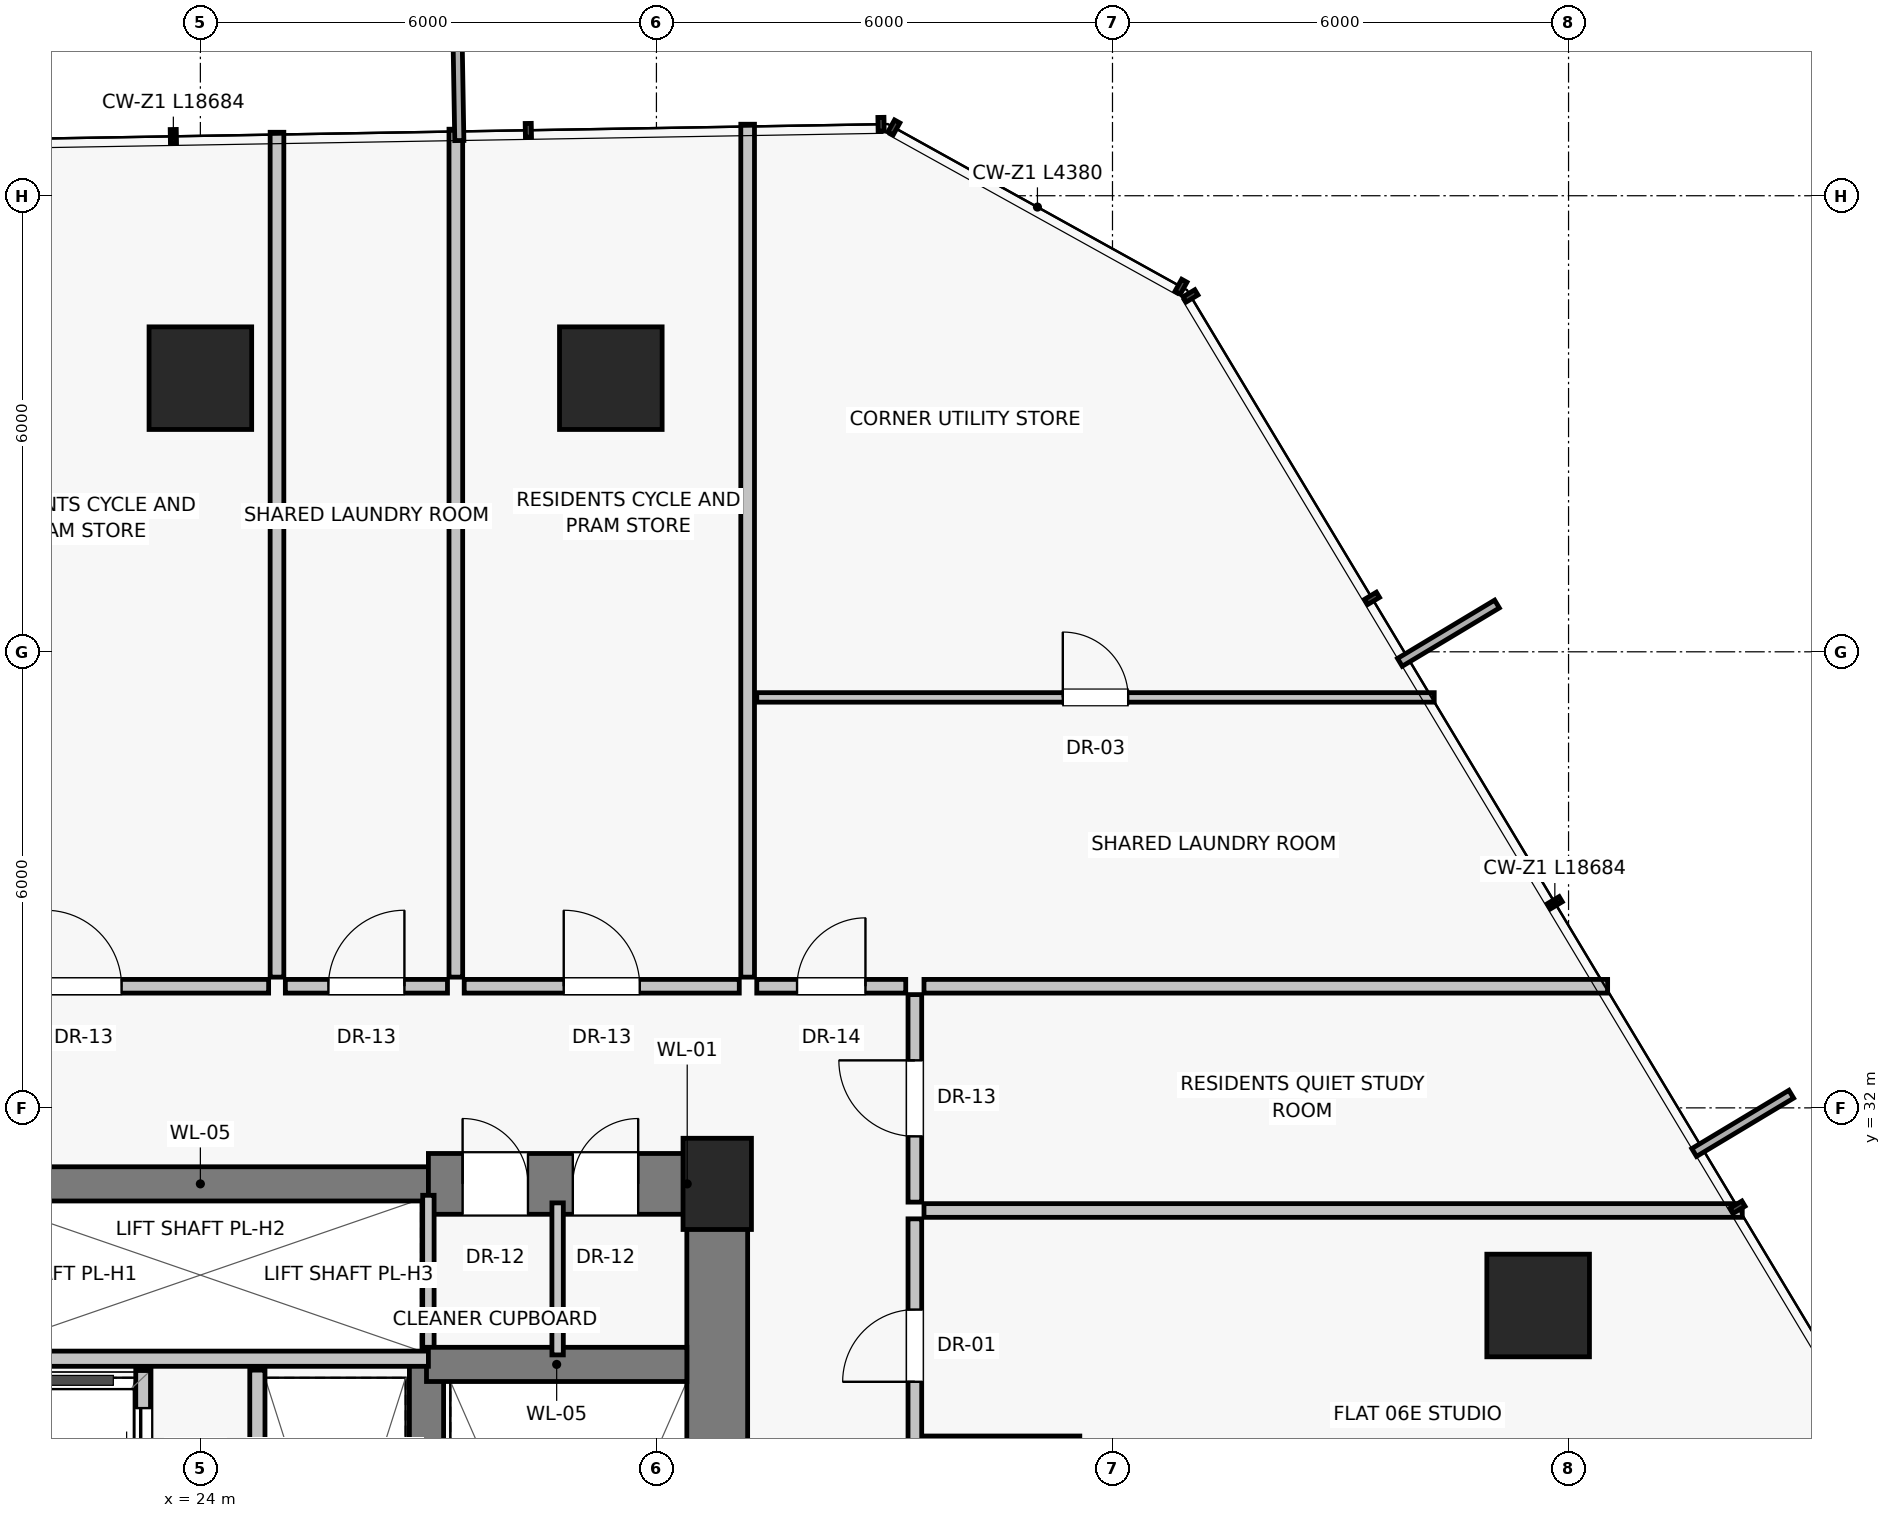
"""IFC4 building model, lengths in metres.
Left out: names, types, materials, properties, quantities, classifications, styles, units other than length and angle.
Written with IfcOpenShell. Run it as: python <this file> out.ifc"""

import sys

from ifc_helpers import new_model, si_unit, direction, frame, frame_2d, origin, origin_2d, place, context, subcontext, project, spatial, rectangle, extrude, source, transform, mapped, element, fill, save


model = new_model("IFC4")
c1 = context("Model", 3, precision=1e-05, world=origin(), true_north=direction((0.0, 1.0)))
c2 = subcontext(c1, "Body", "Model", "MODEL_VIEW")
j1 = project(units=[si_unit("LENGTHUNIT", "METRE"), si_unit("PLANEANGLEUNIT", "RADIAN")], contexts=[c1])
p1 = place(None, origin())
s1 = spatial("IfcSite", under=j1, at=p1, CompositionType="ELEMENT")
p2 = place(p1, origin())
s2 = spatial("IfcBuilding", under=s1, at=p2, CompositionType="ELEMENT")
p3 = place(p2, frame((0.0, 0.0, 27.3)))
s3 = spatial("IfcBuildingStorey", under=s2, at=p3, CompositionType="ELEMENT", Elevation=27.3)
p4 = place(p3, frame((30.8, 31.0, 0.0), z_axis=(0.0, 0.0, 1.0), x_axis=(1.0, 0.0, 0.0)))
e1 = element("IfcColumn", 1, at=p4, inside=s3, PredefinedType="PILASTER", context=c2, shape_type="SweptSolid", body=[
    extrude(rectangle(XDim=0.9, YDim=1.2, at=origin_2d()), origin(), (0.0, 0.0, 1.0), 3.25),
])
for number, where, z_axis, x_axis in (
    (2, (41.6, 29.4, 0.0), (0.0, 0.0, 1.0), (1.0, 0.0, 0.0)),
    (3, (29.4, 41.6, 0.0), (0.0, 0.0, 1.0), (1.0, 0.0, 0.0)),
    (4, (24.0, 41.6, 0.0), (0.0, 0.0, 1.0), (1.0, 0.0, 0.0)),
):
    element("IfcColumn", number, at=place(p3, frame(where, z_axis=z_axis, x_axis=x_axis)), inside=s3, PredefinedType="COLUMN", context=c2, shape_type="SweptSolid", body=[
        extrude(rectangle(XDim=1.35, YDim=1.35, at=origin_2d()), origin(), (0.0, 0.0, 1.0), 3.25),
    ])
p5 = place(p3, frame((30.8, 16.8, 0.0), z_axis=(0.0, 0.0, 1.0), x_axis=(0.0, 1.0, 0.0)))
e5 = element("IfcWall", 5, at=p5, inside=s3, PredefinedType="SHEAR", context=c2, shape_type="SweptSolid", body=[
    extrude(rectangle(XDim=14.2, YDim=0.8, at=frame_2d((7.1, 0.0))), origin(), (0.0, 0.0, 1.0), 3.0),
])
p6 = place(p3, frame((21.0, 31.0, 0.0), z_axis=(0.0, 0.0, 1.0), x_axis=(1.0, 0.0, 0.0)))
e6 = element("IfcWall", 6, at=p6, inside=s3, PredefinedType="SHEAR", context=c2, shape_type="SweptSolid", body=[
    extrude(rectangle(XDim=6.0, YDim=0.45, at=frame_2d((3.0, 0.0))), origin(), (0.0, 0.0, 1.0), 3.0),
])
p7 = place(p3, frame((27.0, 31.0, 0.0), z_axis=(0.0, 0.0, 1.0), x_axis=(1.0, 0.0, 0.0)))
e7 = element("IfcWall", 7, at=p7, inside=s3, PredefinedType="SHEAR", context=c2, shape_type="SweptSolid", body=[
    extrude(rectangle(XDim=3.8, YDim=0.8, at=frame_2d((1.9, 0.0))), origin(), (0.0, 0.0, 1.0), 3.0),
])
p8 = place(p7, frame((0.45, 0.0, 0.0)))
e8 = element("IfcOpeningElement", 8, at=p8, cuts=e7, PredefinedType="OPENING", context=c2, shape_type="SweptSolid", body=[
    extrude(rectangle(XDim=0.86, YDim=2.01, at=frame_2d((0.43, 1.005))), frame((0.0, 0.41, 0.0), z_axis=(0.0, -1.0, 0.0), x_axis=(1.0, 0.0, 0.0)), (0.0, 0.0, 1.0), 0.82),
])
p9 = place(p7, frame((1.9, 0.0, 0.0)))
e9 = element("IfcOpeningElement", 9, at=p9, cuts=e7, PredefinedType="OPENING", context=c2, shape_type="SweptSolid", body=[
    extrude(rectangle(XDim=0.86, YDim=2.01, at=frame_2d((0.43, 1.005))), frame((0.0, 0.41, 0.0), z_axis=(0.0, -1.0, 0.0), x_axis=(1.0, 0.0, 0.0)), (0.0, 0.0, 1.0), 0.82),
])
p10 = place(p3, frame((27.0, 28.65, 0.0), z_axis=(0.0, 0.0, 1.0), x_axis=(0.0, 1.0, 0.0)))
e10 = element("IfcWall", 10, at=p10, inside=s3, PredefinedType="PARTITIONING", context=c2, shape_type="SweptSolid", body=[
    extrude(rectangle(XDim=2.2, YDim=0.15, at=frame_2d((1.1, 0.0))), origin(), (0.0, 0.0, 1.0), 3.0),
])
p11 = place(p3, frame((26.975, 19.8, 0.0), z_axis=(0.0, 0.0, 1.0), x_axis=(0.0, 1.0, 0.0)))
e11 = element("IfcWall", 11, at=p11, inside=s3, PredefinedType="SHEAR", context=c2, shape_type="SweptSolid", body=[
    extrude(rectangle(XDim=8.825, YDim=0.45, at=frame_2d((4.413, 0.0))), origin(), (0.0, 0.0, 1.0), 3.0),
])
p12 = place(p3, frame((26.975, 28.625, 0.0), z_axis=(0.0, 0.0, 1.0), x_axis=(1.0, 0.0, 0.0)))
e12 = element("IfcWall", 12, at=p12, inside=s3, PredefinedType="SHEAR", context=c2, shape_type="SweptSolid", body=[
    extrude(rectangle(XDim=3.425, YDim=0.45, at=frame_2d((1.712, 0.0))), origin(), (0.0, 0.0, 1.0), 3.0),
])
p13 = place(p3, frame((21.0, 28.7, 0.0), z_axis=(0.0, 0.0, 1.0), x_axis=(1.0, 0.0, 0.0)))
e13 = element("IfcWall", 13, at=p13, inside=s3, PredefinedType="SOLIDWALL", context=c2, shape_type="SweptSolid", body=[
    extrude(rectangle(XDim=6.0, YDim=0.2, at=frame_2d((3.0, 0.0))), origin(), (0.0, 0.0, 1.0), 3.0),
])
p14 = place(p3, frame((23.25, 22.6, 0.0), z_axis=(0.0, 0.0, 1.0), x_axis=(0.0, 1.0, 0.0)))
e14 = element("IfcWall", 14, at=p14, inside=s3, PredefinedType="SOLIDWALL", context=c2, shape_type="SweptSolid", body=[
    extrude(rectangle(XDim=5.95, YDim=0.2, at=frame_2d((2.975, 0.0))), origin(), (0.0, 0.0, 1.0), 3.0),
])
p15 = place(p14, frame((0.45, 0.0, 0.0)))
e15 = element("IfcOpeningElement", 15, at=p15, cuts=e14, PredefinedType="OPENING", context=c2, shape_type="SweptSolid", body=[
    extrude(rectangle(XDim=1.1, YDim=2.08, at=frame_2d((0.55, 1.04))), frame((0.0, 0.11, 0.0), z_axis=(0.0, -1.0, 0.0), x_axis=(1.0, 0.0, 0.0)), (0.0, 0.0, 1.0), 0.22),
])
p16 = place(p14, frame((2.4, 0.0, 0.0)))
e16 = element("IfcOpeningElement", 16, at=p16, cuts=e14, PredefinedType="OPENING", context=c2, shape_type="SweptSolid", body=[
    extrude(rectangle(XDim=1.1, YDim=2.08, at=frame_2d((0.55, 1.04))), frame((0.0, 0.11, 0.0), z_axis=(0.0, -1.0, 0.0), x_axis=(1.0, 0.0, 0.0)), (0.0, 0.0, 1.0), 0.22),
])
p17 = place(p14, frame((4.35, 0.0, 0.0)))
e17 = element("IfcOpeningElement", 17, at=p17, cuts=e14, PredefinedType="OPENING", context=c2, shape_type="SweptSolid", body=[
    extrude(rectangle(XDim=1.1, YDim=2.08, at=frame_2d((0.55, 1.04))), frame((0.0, 0.11, 0.0), z_axis=(0.0, -1.0, 0.0), x_axis=(1.0, 0.0, 0.0)), (0.0, 0.0, 1.0), 0.22),
])
p18 = place(p3, frame((24.75, 22.6, 0.0), z_axis=(0.0, 0.0, 1.0), x_axis=(0.0, 1.0, 0.0)))
e18 = element("IfcWall", 18, at=p18, inside=s3, PredefinedType="SOLIDWALL", context=c2, shape_type="SweptSolid", body=[
    extrude(rectangle(XDim=5.95, YDim=0.2, at=frame_2d((2.975, 0.0))), origin(), (0.0, 0.0, 1.0), 3.0),
])
p19 = place(p3, frame((28.7, 28.75, 0.0), z_axis=(0.0, 0.0, 1.0), x_axis=(0.0, 1.0, 0.0)))
e19 = element("IfcWall", 19, at=p19, inside=s3, PredefinedType="PARTITIONING", context=c2, shape_type="SweptSolid", body=[
    extrude(rectangle(XDim=2.0, YDim=0.15, at=frame_2d((1.0, 0.0))), origin(), (0.0, 0.0, 1.0), 3.0),
])
p20 = place(p3, frame((31.2, 33.72, 0.0), z_axis=(0.0, 0.0, 1.0), x_axis=(0.0, 1.0, 0.0)))
e20 = element("IfcWall", 20, at=p20, inside=s3, PredefinedType="PARTITIONING", context=c2, shape_type="SweptSolid", body=[
    extrude(rectangle(XDim=11.221, YDim=0.18, at=frame_2d((5.61, 0.0))), origin(), (0.0, 0.0, 1.0), 3.0),
])
p21 = place(p3, frame((20.029, 33.6, 0.0), z_axis=(0.0, 0.0, 1.0), x_axis=(1.0, 0.0, 0.0)))
e21 = element("IfcWall", 21, at=p21, inside=s3, PredefinedType="PARTITIONING", context=c2, shape_type="SweptSolid", body=[
    extrude(rectangle(XDim=4.869, YDim=0.18, at=frame_2d((2.435, 0.0))), origin(), (0.0, 0.0, 1.0), 3.0),
])
p22 = place(p21, frame((1.935, 0.0, 0.0)))
e22 = element("IfcOpeningElement", 22, at=p22, cuts=e21, PredefinedType="OPENING", context=c2, shape_type="SweptSolid", body=[
    extrude(rectangle(XDim=1.0, YDim=2.01, at=frame_2d((0.5, 1.005))), frame((0.0, 0.1, 0.0), z_axis=(0.0, -1.0, 0.0), x_axis=(1.0, 0.0, 0.0)), (0.0, 0.0, 1.0), 0.2),
])
p23 = place(p3, frame((25.008, 33.72, 0.0), z_axis=(0.0, 0.0, 1.0), x_axis=(0.0, 1.0, 0.0)))
e23 = element("IfcWall", 23, at=p23, inside=s3, PredefinedType="PARTITIONING", context=c2, shape_type="SweptSolid", body=[
    extrude(rectangle(XDim=11.115, YDim=0.18, at=frame_2d((5.558, 0.0))), origin(), (0.0, 0.0, 1.0), 3.0),
])
p24 = place(p3, frame((25.118, 33.6, 0.0), z_axis=(0.0, 0.0, 1.0), x_axis=(1.0, 0.0, 0.0)))
e24 = element("IfcWall", 24, at=p24, inside=s3, PredefinedType="PARTITIONING", context=c2, shape_type="SweptSolid", body=[
    extrude(rectangle(XDim=2.133, YDim=0.18, at=frame_2d((1.066, 0.0))), origin(), (0.0, 0.0, 1.0), 3.0),
])
p25 = place(p24, frame((0.566, 0.0, 0.0)))
e25 = element("IfcOpeningElement", 25, at=p25, cuts=e24, PredefinedType="OPENING", context=c2, shape_type="SweptSolid", body=[
    extrude(rectangle(XDim=1.0, YDim=2.01, at=frame_2d((0.5, 1.005))), frame((0.0, 0.1, 0.0), z_axis=(0.0, -1.0, 0.0), x_axis=(1.0, 0.0, 0.0)), (0.0, 0.0, 1.0), 0.2),
])
p26 = place(p3, frame((27.471, 33.6, 0.0), z_axis=(0.0, 0.0, 1.0), x_axis=(1.0, 0.0, 0.0)))
e26 = element("IfcWall", 26, at=p26, inside=s3, PredefinedType="PARTITIONING", context=c2, shape_type="SweptSolid", body=[
    extrude(rectangle(XDim=3.619, YDim=0.18, at=frame_2d((1.81, 0.0))), origin(), (0.0, 0.0, 1.0), 3.0),
])
p27 = place(p26, frame((1.31, 0.0, 0.0)))
e27 = element("IfcOpeningElement", 27, at=p27, cuts=e26, PredefinedType="OPENING", context=c2, shape_type="SweptSolid", body=[
    extrude(rectangle(XDim=1.0, YDim=2.01, at=frame_2d((0.5, 1.005))), frame((0.0, 0.1, 0.0), z_axis=(0.0, -1.0, 0.0), x_axis=(1.0, 0.0, 0.0)), (0.0, 0.0, 1.0), 0.2),
])
p28 = place(p3, frame((27.361, 33.72, 0.0), z_axis=(0.0, 0.0, 1.0), x_axis=(0.0, 1.0, 0.0)))
e28 = element("IfcWall", 28, at=p28, inside=s3, PredefinedType="PARTITIONING", context=c2, shape_type="SweptSolid", body=[
    extrude(rectangle(XDim=11.155, YDim=0.18, at=frame_2d((5.578, 0.0))), origin(), (0.0, 0.0, 1.0), 3.0),
])
p29 = place(p3, frame((33.52, 33.6, 0.0), z_axis=(0.0, 0.0, 1.0), x_axis=(1.0, 0.0, 0.0)))
e29 = element("IfcWall", 29, at=p29, inside=s3, PredefinedType="PARTITIONING", context=c2, shape_type="SweptSolid", body=[
    extrude(rectangle(XDim=8.994, YDim=0.18, at=frame_2d((4.497, 0.0))), origin(), (0.0, 0.0, 1.0), 3.0),
])
p30 = place(p3, frame((33.4, 30.76, 0.0), z_axis=(0.0, 0.0, 1.0), x_axis=(0.0, 1.0, 0.0)))
e30 = element("IfcWall", 30, at=p30, inside=s3, PredefinedType="PARTITIONING", context=c2, shape_type="SweptSolid", body=[
    extrude(rectangle(XDim=2.73, YDim=0.18, at=frame_2d((1.365, 0.0))), origin(), (0.0, 0.0, 1.0), 3.0),
])
p31 = place(p30, frame((0.865, 0.0, 0.0)))
e31 = element("IfcOpeningElement", 31, at=p31, cuts=e30, PredefinedType="OPENING", context=c2, shape_type="SweptSolid", body=[
    extrude(rectangle(XDim=1.0, YDim=2.01, at=frame_2d((0.5, 1.005))), frame((0.0, 0.1, 0.0), z_axis=(0.0, -1.0, 0.0), x_axis=(1.0, 0.0, 0.0)), (0.0, 0.0, 1.0), 0.2),
])
p32 = place(p3, frame((33.52, 30.65, 0.0), z_axis=(0.0, 0.0, 1.0), x_axis=(1.0, 0.0, 0.0)))
e32 = element("IfcWall", 32, at=p32, inside=s3, PredefinedType="PARTITIONING", context=c2, shape_type="SweptSolid", body=[
    extrude(rectangle(XDim=10.765, YDim=0.18, at=frame_2d((5.383, 0.0))), origin(), (0.0, 0.0, 1.0), 2.299),
])
p33 = place(p3, frame((33.4, 25.368, 0.0), z_axis=(0.0, 0.0, 1.0), x_axis=(0.0, 1.0, 0.0)))
e33 = element("IfcWall", 33, at=p33, inside=s3, PredefinedType="PARTITIONING", context=c2, shape_type="SweptSolid", body=[
    extrude(rectangle(XDim=5.172, YDim=0.18, at=frame_2d((2.586, 0.0))), origin(), (0.0, 0.0, 1.0), 3.0),
])
p34 = place(p33, frame((3.028, 0.0, 0.0)))
e34 = element("IfcOpeningElement", 34, at=p34, cuts=e33, PredefinedType="OPENING", context=c2, shape_type="SweptSolid", body=[
    extrude(rectangle(XDim=0.95, YDim=2.02, at=frame_2d((0.475, 1.01))), frame((0.0, 0.1, 0.0), z_axis=(0.0, -1.0, 0.0), x_axis=(1.0, 0.0, 0.0)), (0.0, 0.0, 1.0), 0.2),
])
p35 = place(p3, frame((33.52, 27.608, 0.0), z_axis=(0.0, 0.0, 1.0), x_axis=(1.0, 0.0, 0.0)))
e35 = element("IfcWall", 35, at=p35, inside=s3, PredefinedType="PARTITIONING", context=c2, shape_type="SweptSolid", body=[
    extrude(rectangle(XDim=2.05, YDim=0.15, at=frame_2d((1.025, 0.0))), origin(), (0.0, 0.0, 1.0), 3.0),
])
p36 = place(p3, frame((31.32, 33.6, 0.0), z_axis=(0.0, 0.0, 1.0), x_axis=(1.0, 0.0, 0.0)))
e36 = element("IfcWall", 36, at=p36, inside=s3, PredefinedType="PARTITIONING", context=c2, shape_type="SweptSolid", body=[
    extrude(rectangle(XDim=1.96, YDim=0.18, at=frame_2d((0.98, 0.0))), origin(), (0.0, 0.0, 1.0), 3.0),
])
p37 = place(p36, frame((0.53, 0.0, 0.0)))
e37 = element("IfcOpeningElement", 37, at=p37, cuts=e36, PredefinedType="OPENING", context=c2, shape_type="SweptSolid", body=[
    extrude(rectangle(XDim=0.9, YDim=2.01, at=frame_2d((0.45, 1.005))), frame((0.0, 0.1, 0.0), z_axis=(0.0, -1.0, 0.0), x_axis=(1.0, 0.0, 0.0)), (0.0, 0.0, 1.0), 0.2),
])
p38 = place(p3, frame((31.32, 37.4, 0.0), z_axis=(0.0, 0.0, 1.0), x_axis=(1.0, 0.0, 0.0)))
e38 = element("IfcWall", 38, at=p38, inside=s3, PredefinedType="PARTITIONING", context=c2, shape_type="SweptSolid", body=[
    extrude(rectangle(XDim=8.913, YDim=0.125, at=frame_2d((4.457, 0.0))), origin(), (0.0, 0.0, 1.0), 3.0),
])
p39 = place(p38, frame((4.026, 0.0, 0.0)))
e39 = element("IfcOpeningElement", 39, at=p39, cuts=e38, PredefinedType="OPENING", context=c2, shape_type="SweptSolid", body=[
    extrude(rectangle(XDim=0.86, YDim=2.01, at=frame_2d((0.43, 1.005))), frame((0.0, 0.073, 0.0), z_axis=(0.0, -1.0, 0.0), x_axis=(1.0, 0.0, 0.0)), (0.0, 0.0, 1.0), 0.145),
])
m1 = source(origin(), c2, "Body", "SweptSolid", [
    extrude(rectangle(XDim=0.86, YDim=2.01, at=frame_2d((0.43, 1.005))), frame((0.0, 0.025, 0.0), z_axis=(0.0, -1.0, 0.0), x_axis=(1.0, 0.0, 0.0)), (0.0, 0.0, 1.0), 0.05),
])
p40 = place(p8, origin())
e40 = element("IfcDoor", 40, at=p40, inside=s3, OperationType="SINGLE_SWING_LEFT", PredefinedType="DOOR", context=c2, shape_type="MappedRepresentation", body=[
    mapped(m1, transform((0.0, 0.0, 0.0), scale=1.0)),
])
fill(e8, e40)
p41 = place(p9, origin())
e41 = element("IfcDoor", 41, at=p41, inside=s3, OperationType="SINGLE_SWING_RIGHT", PredefinedType="DOOR", context=c2, shape_type="MappedRepresentation", body=[
    mapped(m1, transform((0.0, 0.0, 0.0), scale=1.0)),
])
fill(e9, e41)
m2 = source(origin(), c2, "Body", "SweptSolid", [
    extrude(rectangle(XDim=1.1, YDim=2.08, at=frame_2d((0.55, 1.04))), frame((0.0, 0.025, 0.0), z_axis=(0.0, -1.0, 0.0), x_axis=(1.0, 0.0, 0.0)), (0.0, 0.0, 1.0), 0.05),
])
p42 = place(p17, origin())
e42 = element("IfcDoor", 42, at=p42, inside=s3, OperationType="SLIDING_TO_LEFT", PredefinedType="DOOR", context=c2, shape_type="MappedRepresentation", body=[
    mapped(m2, transform((0.0, 0.0, 0.0), scale=1.0)),
])
fill(e17, e42)
m3 = source(origin(), c2, "Body", "SweptSolid", [
    extrude(rectangle(XDim=1.0, YDim=2.01, at=frame_2d((0.5, 1.005))), frame((0.0, 0.025, 0.0), z_axis=(0.0, -1.0, 0.0), x_axis=(1.0, 0.0, 0.0)), (0.0, 0.0, 1.0), 0.05),
])
p43 = place(p22, origin())
e43 = element("IfcDoor", 43, at=p43, inside=s3, OperationType="SINGLE_SWING_LEFT", PredefinedType="DOOR", context=c2, shape_type="MappedRepresentation", body=[
    mapped(m3, transform((0.0, 0.0, 0.0), scale=1.0)),
])
fill(e22, e43)
p44 = place(p25, origin())
e44 = element("IfcDoor", 44, at=p44, inside=s3, OperationType="SINGLE_SWING_RIGHT", PredefinedType="DOOR", context=c2, shape_type="MappedRepresentation", body=[
    mapped(m3, transform((0.0, 0.0, 0.0), scale=1.0)),
])
fill(e25, e44)
p45 = place(p27, origin())
e45 = element("IfcDoor", 45, at=p45, inside=s3, OperationType="SINGLE_SWING_LEFT", PredefinedType="DOOR", context=c2, shape_type="MappedRepresentation", body=[
    mapped(m3, transform((0.0, 0.0, 0.0), scale=1.0)),
])
fill(e27, e45)
p46 = place(p31, origin())
e46 = element("IfcDoor", 46, at=p46, inside=s3, OperationType="SINGLE_SWING_RIGHT", PredefinedType="DOOR", context=c2, shape_type="MappedRepresentation", body=[
    mapped(m3, transform((0.0, 0.0, 0.0), scale=1.0)),
])
fill(e31, e46)
m4 = source(origin(), c2, "Body", "SweptSolid", [
    extrude(rectangle(XDim=0.95, YDim=2.02, at=frame_2d((0.475, 1.01))), frame((0.0, 0.025, 0.0), z_axis=(0.0, -1.0, 0.0), x_axis=(1.0, 0.0, 0.0)), (0.0, 0.0, 1.0), 0.05),
])
p47 = place(p34, origin())
e47 = element("IfcDoor", 47, at=p47, inside=s3, OperationType="SINGLE_SWING_LEFT", PredefinedType="DOOR", context=c2, shape_type="MappedRepresentation", body=[
    mapped(m4, transform((0.0, 0.0, 0.0), scale=1.0)),
])
fill(e34, e47)
m5 = source(origin(), c2, "Body", "SweptSolid", [
    extrude(rectangle(XDim=0.9, YDim=2.01, at=frame_2d((0.45, 1.005))), frame((0.0, 0.025, 0.0), z_axis=(0.0, -1.0, 0.0), x_axis=(1.0, 0.0, 0.0)), (0.0, 0.0, 1.0), 0.05),
])
p48 = place(p37, origin())
e48 = element("IfcDoor", 48, at=p48, inside=s3, OperationType="SINGLE_SWING_RIGHT", PredefinedType="DOOR", context=c2, shape_type="MappedRepresentation", body=[
    mapped(m5, transform((0.0, 0.0, 0.0), scale=1.0)),
])
fill(e37, e48)
p49 = place(p39, origin())
e49 = element("IfcDoor", 49, at=p49, inside=s3, OperationType="SINGLE_SWING_LEFT", PredefinedType="DOOR", context=c2, shape_type="MappedRepresentation", body=[
    mapped(m1, transform((0.0, 0.0, 0.0), scale=1.0)),
])
fill(e39, e49)
save(model, sys.argv[1])
